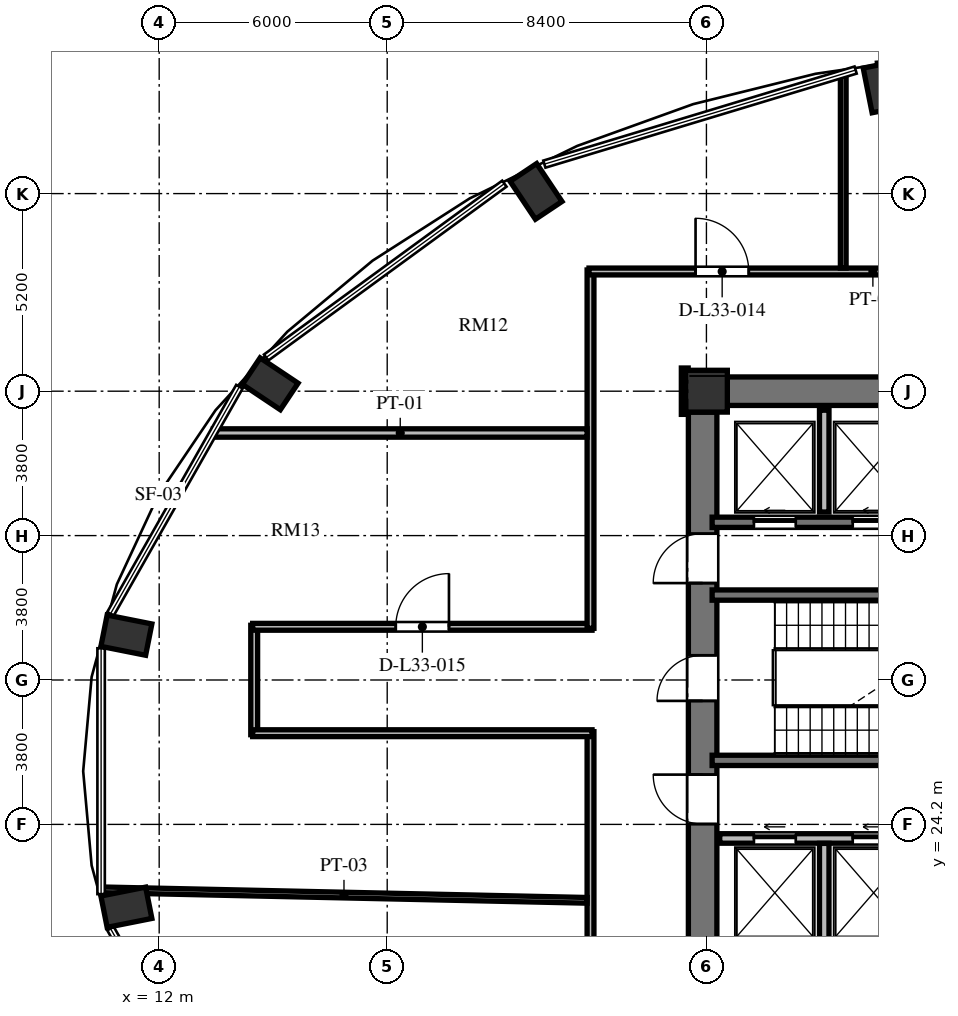
"""IFC4 building model, lengths in metres.
Left out: names, types, materials, properties, quantities, classifications, styles, units other than length and angle.
Written with IfcOpenShell. Run it as: python <this file> out.ifc"""

import sys

from ifc_helpers import new_model, si_unit, direction, frame, frame_2d, origin, origin_2d, place, context, subcontext, project, spatial, rectangle, extrude, element, fill, save


model = new_model("IFC4")
c1 = context("Model", 3, precision=1e-05, world=origin(), true_north=direction((0.0, 1.0)))
c2 = subcontext(c1, "Body", "Model", "MODEL_VIEW")
j1 = project(units=[si_unit("LENGTHUNIT", "METRE"), si_unit("PLANEANGLEUNIT", "RADIAN")], contexts=[c1])
p1 = place(None, origin())
s1 = spatial("IfcSite", under=j1, at=p1, CompositionType="ELEMENT")
p2 = place(p1, origin())
s2 = spatial("IfcBuilding", under=s1, at=p2, CompositionType="ELEMENT")
p3 = place(p2, frame((0.0, 0.0, 129.168)))
s3 = spatial("IfcBuildingStorey", under=s2, at=p3, CompositionType="ELEMENT", Elevation=129.168)
for number, where, z_axis, x_axis in (
    (1, (31.054, 43.597, 0.0), (0.0, 0.0, 1.0), (-0.195, 0.981, 0.0)),
    (2, (21.916, 40.857, 0.0), (0.0, 0.0, 1.0), (-0.556, 0.831, 0.0)),
    (3, (14.922, 35.795, 0.0), (0.0, 0.0, 1.0), (-0.831, 0.556, 0.0)),
    (4, (11.137, 29.18, 0.0), (0.0, 0.0, 1.0), (-0.981, 0.195, 0.0)),
    (5, (11.137, 22.02, 0.0), (0.0, 0.0, 1.0), (-0.981, -0.195, 0.0)),
):
    element("IfcColumn", number, at=place(p3, frame(where, z_axis=z_axis, x_axis=x_axis)), inside=s3, PredefinedType="COLUMN", context=c2, shape_type="SweptSolid", body=[
        extrude(rectangle(XDim=1.2, YDim=0.84, at=origin_2d()), origin(), (0.0, 0.0, 1.0), 3.648),
    ])
p4 = place(p3, frame((26.4, 35.6, 0.0), z_axis=(0.0, 0.0, 1.0), x_axis=(1.0, 0.0, 0.0)))
e6 = element("IfcColumn", 6, at=p4, inside=s3, PredefinedType="COLUMN", context=c2, shape_type="SweptSolid", body=[
    extrude(rectangle(XDim=1.1, YDim=1.1, at=origin_2d()), origin(), (0.0, 0.0, 1.0), 3.648),
])
p5 = place(p3, frame((26.3, 20.95, 0.0), z_axis=(0.0, 0.0, 1.0), x_axis=(0.0, 1.0, 0.0)))
e7 = element("IfcWall", 7, at=p5, inside=s3, PredefinedType="SHEAR", context=c2, shape_type="SweptSolid", body=[
    extrude(rectangle(XDim=14.1, YDim=0.75, at=frame_2d((7.05, 0.0))), origin(), (0.0, 0.0, 1.0), 3.648),
])
p6 = place(p5, frame((6.5, 0.0, 0.0)))
e8 = element("IfcOpeningElement", 8, at=p6, cuts=e7, PredefinedType="OPENING", context=c2, shape_type="SweptSolid", body=[
    extrude(rectangle(XDim=1.2, YDim=2.15, at=frame_2d((0.6, 1.075))), frame((0.0, 0.385, 0.0), z_axis=(0.0, -1.0, 0.0), x_axis=(1.0, 0.0, 0.0)), (0.0, 0.0, 1.0), 0.77),
])
p7 = place(p5, frame((9.6, 0.0, 0.0)))
e9 = element("IfcOpeningElement", 9, at=p7, cuts=e7, PredefinedType="OPENING", context=c2, shape_type="SweptSolid", body=[
    extrude(rectangle(XDim=1.3, YDim=2.2, at=frame_2d((0.65, 1.1))), frame((0.0, 0.385, 0.0), z_axis=(0.0, -1.0, 0.0), x_axis=(1.0, 0.0, 0.0)), (0.0, 0.0, 1.0), 0.77),
])
p8 = place(p5, frame((3.26, 0.0, 0.0)))
e10 = element("IfcOpeningElement", 10, at=p8, cuts=e7, PredefinedType="OPENING", context=c2, shape_type="SweptSolid", body=[
    extrude(rectangle(XDim=1.3, YDim=2.2, at=frame_2d((0.65, 1.1))), frame((0.0, 0.385, 0.0), z_axis=(0.0, -1.0, 0.0), x_axis=(1.0, 0.0, 0.0)), (0.0, 0.0, 1.0), 0.77),
])
p9 = place(p3, frame((26.95, 35.6, 0.0), z_axis=(0.0, 0.0, 1.0), x_axis=(1.0, 0.0, 0.0)))
e11 = element("IfcWall", 11, at=p9, inside=s3, PredefinedType="SHEAR", context=c2, shape_type="SweptSolid", body=[
    extrude(rectangle(XDim=5.375, YDim=0.75, at=frame_2d((2.688, 0.0))), origin(), (0.0, 0.0, 1.0), 3.648),
])
p10 = place(p3, frame((36.179, 44.453, 0.0), z_axis=(0.0, 0.0, 1.0), x_axis=(-0.997431890304, -0.071621394884, 0.0)))
e12 = element("IfcWall", 12, at=p10, inside=s3, PredefinedType="SOLIDWALL", context=c2, shape_type="SweptSolid", body=[
    extrude(rectangle(XDim=5.284, YDim=0.32, at=frame_2d((2.642, 0.0))), origin(), (0.0, 0.0, 1.0), 3.198),
])
p11 = place(p10, frame((2.042, 0.0, 0.85)))
e13 = element("IfcOpeningElement", 13, at=p11, cuts=e12, PredefinedType="OPENING", context=c2, shape_type="SweptSolid", body=[
    extrude(rectangle(XDim=1.2, YDim=1.8, at=frame_2d((0.6, 0.9))), frame((0.0, 0.17, 0.0), z_axis=(0.0, -1.0, 0.0), x_axis=(1.0, 0.0, 0.0)), (0.0, 0.0, 1.0), 0.34),
])
for number, where, z_axis, x_axis in (
    (14, (26.55, 30.235, 0.0), (0.0, 0.0, 1.0), (1.0, 0.0, 0.0)),
    (15, (26.55, 25.885, 0.0), (0.0, 0.0, 1.0), (1.0, 0.0, 0.0)),
):
    element("IfcWall", number, at=place(p3, frame(where, z_axis=z_axis, x_axis=x_axis)), inside=s3, PredefinedType="SHEAR", context=c2, shape_type="SweptSolid", body=[
        extrude(rectangle(XDim=7.985, YDim=0.27, at=frame_2d((3.992, 0.0))), origin(), (0.0, 0.0, 1.0), 3.648),
    ])
p12 = place(p3, frame((26.55, 32.15, 0.0), z_axis=(0.0, 0.0, 1.0), x_axis=(1.0, 0.0, 0.0)))
e16 = element("IfcWall", 16, at=p12, inside=s3, PredefinedType="SHEAR", context=c2, shape_type="SweptSolid", body=[
    extrude(rectangle(XDim=16.4, YDim=0.27, at=frame_2d((8.2, 0.0))), origin(), (0.0, 0.0, 1.0), 3.648),
])
p13 = place(p12, frame((1.1, 0.0, 0.0)))
e17 = element("IfcOpeningElement", 17, at=p13, cuts=e16, PredefinedType="OPENING", context=c2, shape_type="SweptSolid", body=[
    extrude(rectangle(XDim=1.1, YDim=2.2, at=frame_2d((0.55, 1.1))), frame((0.0, 0.145, 0.0), z_axis=(0.0, -1.0, 0.0), x_axis=(1.0, 0.0, 0.0)), (0.0, 0.0, 1.0), 0.29),
])
p14 = place(p12, frame((3.7, 0.0, 0.0)))
e18 = element("IfcOpeningElement", 18, at=p14, cuts=e16, PredefinedType="OPENING", context=c2, shape_type="SweptSolid", body=[
    extrude(rectangle(XDim=1.1, YDim=2.2, at=frame_2d((0.55, 1.1))), frame((0.0, 0.145, 0.0), z_axis=(0.0, -1.0, 0.0), x_axis=(1.0, 0.0, 0.0)), (0.0, 0.0, 1.0), 0.29),
])
p15 = place(p12, frame((6.5, 0.0, 0.0)))
e19 = element("IfcOpeningElement", 19, at=p15, cuts=e16, PredefinedType="OPENING", context=c2, shape_type="SweptSolid", body=[
    extrude(rectangle(XDim=1.1, YDim=2.2, at=frame_2d((0.55, 1.1))), frame((0.0, 0.145, 0.0), z_axis=(0.0, -1.0, 0.0), x_axis=(1.0, 0.0, 0.0)), (0.0, 0.0, 1.0), 0.29),
])
p16 = place(p12, frame((9.1, 0.0, 0.0)))
e20 = element("IfcOpeningElement", 20, at=p16, cuts=e16, PredefinedType="OPENING", context=c2, shape_type="SweptSolid", body=[
    extrude(rectangle(XDim=1.1, YDim=2.2, at=frame_2d((0.55, 1.1))), frame((0.0, 0.145, 0.0), z_axis=(0.0, -1.0, 0.0), x_axis=(1.0, 0.0, 0.0)), (0.0, 0.0, 1.0), 0.29),
])
p17 = place(p12, frame((11.9, 0.0, 0.0)))
e21 = element("IfcOpeningElement", 21, at=p17, cuts=e16, PredefinedType="OPENING", context=c2, shape_type="SweptSolid", body=[
    extrude(rectangle(XDim=1.1, YDim=2.2, at=frame_2d((0.55, 1.1))), frame((0.0, 0.145, 0.0), z_axis=(0.0, -1.0, 0.0), x_axis=(1.0, 0.0, 0.0)), (0.0, 0.0, 1.0), 0.29),
])
p18 = place(p12, frame((14.5, 0.0, 0.0)))
e22 = element("IfcOpeningElement", 22, at=p18, cuts=e16, PredefinedType="OPENING", context=c2, shape_type="SweptSolid", body=[
    extrude(rectangle(XDim=1.1, YDim=2.2, at=frame_2d((0.55, 1.1))), frame((0.0, 0.145, 0.0), z_axis=(0.0, -1.0, 0.0), x_axis=(1.0, 0.0, 0.0)), (0.0, 0.0, 1.0), 0.29),
])
p19 = place(p3, frame((26.75, 23.83, 0.0), z_axis=(0.0, 0.0, 1.0), x_axis=(1.0, 0.0, 0.0)))
e23 = element("IfcWall", 23, at=p19, inside=s3, PredefinedType="SOLIDWALL", context=c2, shape_type="SweptSolid", body=[
    extrude(rectangle(XDim=16.2, YDim=0.25, at=frame_2d((8.1, 0.0))), origin(), (0.0, 0.0, 1.0), 3.198),
])
p20 = place(p19, frame((0.9, 0.0, 0.0)))
e24 = element("IfcOpeningElement", 24, at=p20, cuts=e23, PredefinedType="OPENING", context=c2, shape_type="SweptSolid", body=[
    extrude(rectangle(XDim=1.1, YDim=2.2, at=frame_2d((0.55, 1.1))), frame((0.0, 0.135, 0.0), z_axis=(0.0, -1.0, 0.0), x_axis=(1.0, 0.0, 0.0)), (0.0, 0.0, 1.0), 0.27),
])
p21 = place(p19, frame((3.5, 0.0, 0.0)))
e25 = element("IfcOpeningElement", 25, at=p21, cuts=e23, PredefinedType="OPENING", context=c2, shape_type="SweptSolid", body=[
    extrude(rectangle(XDim=1.1, YDim=2.2, at=frame_2d((0.55, 1.1))), frame((0.0, 0.135, 0.0), z_axis=(0.0, -1.0, 0.0), x_axis=(1.0, 0.0, 0.0)), (0.0, 0.0, 1.0), 0.27),
])
p22 = place(p19, frame((6.3, 0.0, 0.0)))
e26 = element("IfcOpeningElement", 26, at=p22, cuts=e23, PredefinedType="OPENING", context=c2, shape_type="SweptSolid", body=[
    extrude(rectangle(XDim=1.1, YDim=2.2, at=frame_2d((0.55, 1.1))), frame((0.0, 0.135, 0.0), z_axis=(0.0, -1.0, 0.0), x_axis=(1.0, 0.0, 0.0)), (0.0, 0.0, 1.0), 0.27),
])
p23 = place(p19, frame((8.9, 0.0, 0.0)))
e27 = element("IfcOpeningElement", 27, at=p23, cuts=e23, PredefinedType="OPENING", context=c2, shape_type="SweptSolid", body=[
    extrude(rectangle(XDim=1.1, YDim=2.2, at=frame_2d((0.55, 1.1))), frame((0.0, 0.135, 0.0), z_axis=(0.0, -1.0, 0.0), x_axis=(1.0, 0.0, 0.0)), (0.0, 0.0, 1.0), 0.27),
])
p24 = place(p19, frame((11.7, 0.0, 0.0)))
e28 = element("IfcOpeningElement", 28, at=p24, cuts=e23, PredefinedType="OPENING", context=c2, shape_type="SweptSolid", body=[
    extrude(rectangle(XDim=1.1, YDim=2.2, at=frame_2d((0.55, 1.1))), frame((0.0, 0.135, 0.0), z_axis=(0.0, -1.0, 0.0), x_axis=(1.0, 0.0, 0.0)), (0.0, 0.0, 1.0), 0.27),
])
p25 = place(p19, frame((14.15, 0.0, 0.0)))
e29 = element("IfcOpeningElement", 29, at=p25, cuts=e23, PredefinedType="OPENING", context=c2, shape_type="SweptSolid", body=[
    extrude(rectangle(XDim=1.4, YDim=2.3, at=frame_2d((0.7, 1.15))), frame((0.0, 0.135, 0.0), z_axis=(0.0, -1.0, 0.0), x_axis=(1.0, 0.0, 0.0)), (0.0, 0.0, 1.0), 0.27),
])
p26 = place(p3, frame((29.5, 32.42, 0.0), z_axis=(0.0, 0.0, 1.0), x_axis=(0.0, 1.0, 0.0)))
e30 = element("IfcWall", 30, at=p26, inside=s3, PredefinedType="SOLIDWALL", context=c2, shape_type="SweptSolid", body=[
    extrude(rectangle(XDim=2.68, YDim=0.25, at=frame_2d((1.34, 0.0))), origin(), (0.0, 0.0, 1.0), 3.198),
])
p27 = place(p3, frame((29.5, 20.9, 0.0), z_axis=(0.0, 0.0, 1.0), x_axis=(0.0, 1.0, 0.0)))
e31 = element("IfcWall", 31, at=p27, inside=s3, PredefinedType="SOLIDWALL", context=c2, shape_type="SweptSolid", body=[
    extrude(rectangle(XDim=2.8, YDim=0.25, at=frame_2d((1.4, 0.0))), origin(), (0.0, 0.0, 1.0), 3.198),
])
p28 = place(p3, frame((14.5, 26.56, 0.0), z_axis=(0.0, 0.0, 1.0), x_axis=(0.0, 1.0, 0.0)))
e32 = element("IfcWall", 32, at=p28, inside=s3, PredefinedType="PARTITIONING", context=c2, shape_type="SweptSolid", body=[
    extrude(rectangle(XDim=2.88, YDim=0.18, at=frame_2d((1.44, 0.0))), origin(), (0.0, 0.0, 1.0), 2.783),
])
p29 = place(p3, frame((14.46, 29.4, 0.0), z_axis=(0.0, 0.0, 1.0), x_axis=(1.0, 0.0, 0.0)))
e33 = element("IfcWall", 33, at=p29, inside=s3, PredefinedType="PARTITIONING", context=c2, shape_type="SweptSolid", body=[
    extrude(rectangle(XDim=8.93, YDim=0.18, at=frame_2d((4.465, 0.0))), origin(), (0.0, 0.0, 1.0), 3.198),
])
p30 = place(p29, frame((3.765, 0.0, 0.0)))
e34 = element("IfcOpeningElement", 34, at=p30, cuts=e33, PredefinedType="OPENING", context=c2, shape_type="SweptSolid", body=[
    extrude(rectangle(XDim=1.4, YDim=2.2, at=frame_2d((0.7, 1.1))), frame((0.0, 0.1, 0.0), z_axis=(0.0, -1.0, 0.0), x_axis=(1.0, 0.0, 0.0)), (0.0, 0.0, 1.0), 0.2),
])
p31 = place(p3, frame((23.35, 29.36, 0.0), z_axis=(0.0, 0.0, 1.0), x_axis=(0.0, 1.0, 0.0)))
e35 = element("IfcWall", 35, at=p31, inside=s3, PredefinedType="PARTITIONING", context=c2, shape_type="SweptSolid", body=[
    extrude(rectangle(XDim=9.43, YDim=0.18, at=frame_2d((4.715, 0.0))), origin(), (0.0, 0.0, 1.0), 3.198),
])
p32 = place(p3, frame((23.31, 38.75, 0.0), z_axis=(0.0, 0.0, 1.0), x_axis=(1.0, 0.0, 0.0)))
e36 = element("IfcWall", 36, at=p32, inside=s3, PredefinedType="PARTITIONING", context=c2, shape_type="SweptSolid", body=[
    extrude(rectangle(XDim=29.88, YDim=0.18, at=frame_2d((14.94, 0.0))), origin(), (0.0, 0.0, 1.0), 2.823),
])
p33 = place(p32, frame((25.426, 0.0, 0.0)))
e37 = element("IfcOpeningElement", 37, at=p33, cuts=e36, PredefinedType="OPENING", context=c2, shape_type="SweptSolid", body=[
    extrude(rectangle(XDim=1.4, YDim=2.2, at=frame_2d((0.7, 1.1))), frame((0.0, 0.1, 0.0), z_axis=(0.0, -1.0, 0.0), x_axis=(1.0, 0.0, 0.0)), (0.0, 0.0, 1.0), 0.2),
])
p34 = place(p32, frame((17.99, 0.0, 0.0)))
e38 = element("IfcOpeningElement", 38, at=p34, cuts=e36, PredefinedType="OPENING", context=c2, shape_type="SweptSolid", body=[
    extrude(rectangle(XDim=1.4, YDim=2.2, at=frame_2d((0.7, 1.1))), frame((0.0, 0.1, 0.0), z_axis=(0.0, -1.0, 0.0), x_axis=(1.0, 0.0, 0.0)), (0.0, 0.0, 1.0), 0.2),
])
p35 = place(p32, frame((11.39, 0.0, 0.0)))
e39 = element("IfcOpeningElement", 39, at=p35, cuts=e36, PredefinedType="OPENING", context=c2, shape_type="SweptSolid", body=[
    extrude(rectangle(XDim=1.4, YDim=2.2, at=frame_2d((0.7, 1.1))), frame((0.0, 0.1, 0.0), z_axis=(0.0, -1.0, 0.0), x_axis=(1.0, 0.0, 0.0)), (0.0, 0.0, 1.0), 0.2),
])
p36 = place(p32, frame((2.804, 0.0, 0.0)))
e40 = element("IfcOpeningElement", 40, at=p36, cuts=e36, PredefinedType="OPENING", context=c2, shape_type="SweptSolid", body=[
    extrude(rectangle(XDim=1.4, YDim=2.2, at=frame_2d((0.7, 1.1))), frame((0.0, 0.1, 0.0), z_axis=(0.0, -1.0, 0.0), x_axis=(1.0, 0.0, 0.0)), (0.0, 0.0, 1.0), 0.2),
])
p37 = place(p3, frame((25.83, 36.21, 0.0), z_axis=(0.0, 0.0, 1.0), x_axis=(0.0, -1.0, 0.0)))
e41 = element("IfcWall", 41, at=p37, inside=s3, PredefinedType="PARTITIONING", context=c2, shape_type="SweptSolid", body=[
    extrude(rectangle(XDim=1.22, YDim=0.18, at=frame_2d((0.61, 0.0))), origin(), (0.0, 0.0, 1.0), 3.198),
])
p38 = place(p3, frame((23.35, 17.36, 0.0), z_axis=(0.0, 0.0, 1.0), x_axis=(0.0, 1.0, 0.0)))
e42 = element("IfcWall", 42, at=p38, inside=s3, PredefinedType="PARTITIONING", context=c2, shape_type="SweptSolid", body=[
    extrude(rectangle(XDim=9.28, YDim=0.18, at=frame_2d((4.64, 0.0))), origin(), (0.0, 0.0, 1.0), 3.198),
])
p39 = place(p3, frame((23.39, 26.6, 0.0), z_axis=(0.0, 0.0, 1.0), x_axis=(-1.0, 0.0, 0.0)))
e43 = element("IfcWall", 43, at=p39, inside=s3, PredefinedType="PARTITIONING", context=c2, shape_type="SweptSolid", body=[
    extrude(rectangle(XDim=8.93, YDim=0.18, at=frame_2d((4.465, 0.0))), origin(), (0.0, 0.0, 1.0), 3.198),
])
p40 = place(p3, frame((10.465, 22.479, 0.0), z_axis=(0.0, 0.0, 1.0), x_axis=(0.999765147572, -0.021671402821, 0.0)))
e44 = element("IfcWall", 44, at=p40, inside=s3, PredefinedType="PARTITIONING", context=c2, shape_type="SweptSolid", body=[
    extrude(rectangle(XDim=12.798, YDim=0.15, at=frame_2d((6.399, 0.0))), origin(), (0.0, 0.0, 1.0), 3.198),
])
p41 = place(p3, frame((13.426, 34.5, 0.0), z_axis=(0.0, 0.0, 1.0), x_axis=(1.0, 0.0, 0.0)))
e45 = element("IfcWall", 45, at=p41, inside=s3, PredefinedType="PARTITIONING", context=c2, shape_type="SweptSolid", body=[
    extrude(rectangle(XDim=9.834, YDim=0.22, at=frame_2d((4.917, 0.0))), origin(), (0.0, 0.0, 1.0), 3.198),
])
p42 = place(p3, frame((30.0, 38.84, 0.0), z_axis=(0.0, 0.0, 1.0), x_axis=(0.0, 1.0, 0.0)))
e46 = element("IfcWall", 46, at=p42, inside=s3, PredefinedType="PARTITIONING", context=c2, shape_type="SweptSolid", body=[
    extrude(rectangle(XDim=5.098, YDim=0.15, at=frame_2d((2.549, 0.0))), origin(), (0.0, 0.0, 1.0), 3.198),
])
p43 = place(p6, origin())
e47 = element("IfcDoor", 47, at=p43, inside=s3, OperationType="SINGLE_SWING_LEFT", PredefinedType="DOOR", context=c2, shape_type="SweptSolid", body=[
    extrude(rectangle(XDim=1.2, YDim=2.15, at=frame_2d((0.6, 1.075))), frame((0.0, 0.025, 0.0), z_axis=(0.0, -1.0, 0.0), x_axis=(1.0, 0.0, 0.0)), (0.0, 0.0, 1.0), 0.05),
])
fill(e8, e47)
p44 = place(p7, origin())
e48 = element("IfcDoor", 48, at=p44, inside=s3, OperationType="SINGLE_SWING_LEFT", PredefinedType="DOOR", context=c2, shape_type="SweptSolid", body=[
    extrude(rectangle(XDim=1.3, YDim=2.2, at=frame_2d((0.65, 1.1))), frame((0.0, 0.025, 0.0), z_axis=(0.0, -1.0, 0.0), x_axis=(1.0, 0.0, 0.0)), (0.0, 0.0, 1.0), 0.05),
])
fill(e9, e48)
p45 = place(p8, origin())
e49 = element("IfcDoor", 49, at=p45, inside=s3, OperationType="SINGLE_SWING_RIGHT", PredefinedType="DOOR", context=c2, shape_type="SweptSolid", body=[
    extrude(rectangle(XDim=1.3, YDim=2.2, at=frame_2d((0.65, 1.1))), frame((0.0, 0.025, 0.0), z_axis=(0.0, -1.0, 0.0), x_axis=(1.0, 0.0, 0.0)), (0.0, 0.0, 1.0), 0.05),
])
fill(e10, e49)
p46 = place(p13, origin())
e50 = element("IfcDoor", 50, at=p46, inside=s3, OperationType="SLIDING_TO_LEFT", PredefinedType="DOOR", context=c2, shape_type="SweptSolid", body=[
    extrude(rectangle(XDim=1.1, YDim=2.2, at=frame_2d((0.55, 1.1))), frame((0.0, 0.025, 0.0), z_axis=(0.0, -1.0, 0.0), x_axis=(1.0, 0.0, 0.0)), (0.0, 0.0, 1.0), 0.05),
])
fill(e17, e50)
p47 = place(p14, origin())
e51 = element("IfcDoor", 51, at=p47, inside=s3, OperationType="SLIDING_TO_LEFT", PredefinedType="DOOR", context=c2, shape_type="SweptSolid", body=[
    extrude(rectangle(XDim=1.1, YDim=2.2, at=frame_2d((0.55, 1.1))), frame((0.0, 0.025, 0.0), z_axis=(0.0, -1.0, 0.0), x_axis=(1.0, 0.0, 0.0)), (0.0, 0.0, 1.0), 0.05),
])
fill(e18, e51)
p48 = place(p20, origin())
e52 = element("IfcDoor", 52, at=p48, inside=s3, OperationType="SLIDING_TO_LEFT", PredefinedType="DOOR", context=c2, shape_type="SweptSolid", body=[
    extrude(rectangle(XDim=1.1, YDim=2.2, at=frame_2d((0.55, 1.1))), frame((0.0, 0.025, 0.0), z_axis=(0.0, -1.0, 0.0), x_axis=(1.0, 0.0, 0.0)), (0.0, 0.0, 1.0), 0.05),
])
fill(e24, e52)
p49 = place(p21, origin())
e53 = element("IfcDoor", 53, at=p49, inside=s3, OperationType="SLIDING_TO_LEFT", PredefinedType="DOOR", context=c2, shape_type="SweptSolid", body=[
    extrude(rectangle(XDim=1.1, YDim=2.2, at=frame_2d((0.55, 1.1))), frame((0.0, 0.025, 0.0), z_axis=(0.0, -1.0, 0.0), x_axis=(1.0, 0.0, 0.0)), (0.0, 0.0, 1.0), 0.05),
])
fill(e25, e53)
p50 = place(p36, origin())
e54 = element("IfcDoor", 54, at=p50, inside=s3, OperationType="SINGLE_SWING_LEFT", PredefinedType="DOOR", context=c2, shape_type="SweptSolid", body=[
    extrude(rectangle(XDim=1.4, YDim=2.2, at=frame_2d((0.7, 1.1))), frame((0.0, 0.025, 0.0), z_axis=(0.0, -1.0, 0.0), x_axis=(1.0, 0.0, 0.0)), (0.0, 0.0, 1.0), 0.05),
])
fill(e40, e54)
p51 = place(p30, origin())
e55 = element("IfcDoor", 55, at=p51, inside=s3, OperationType="SINGLE_SWING_RIGHT", PredefinedType="DOOR", context=c2, shape_type="SweptSolid", body=[
    extrude(rectangle(XDim=1.4, YDim=2.2, at=frame_2d((0.7, 1.1))), frame((0.0, 0.025, 0.0), z_axis=(0.0, -1.0, 0.0), x_axis=(1.0, 0.0, 0.0)), (0.0, 0.0, 1.0), 0.05),
])
fill(e34, e55)
save(model, sys.argv[1])
